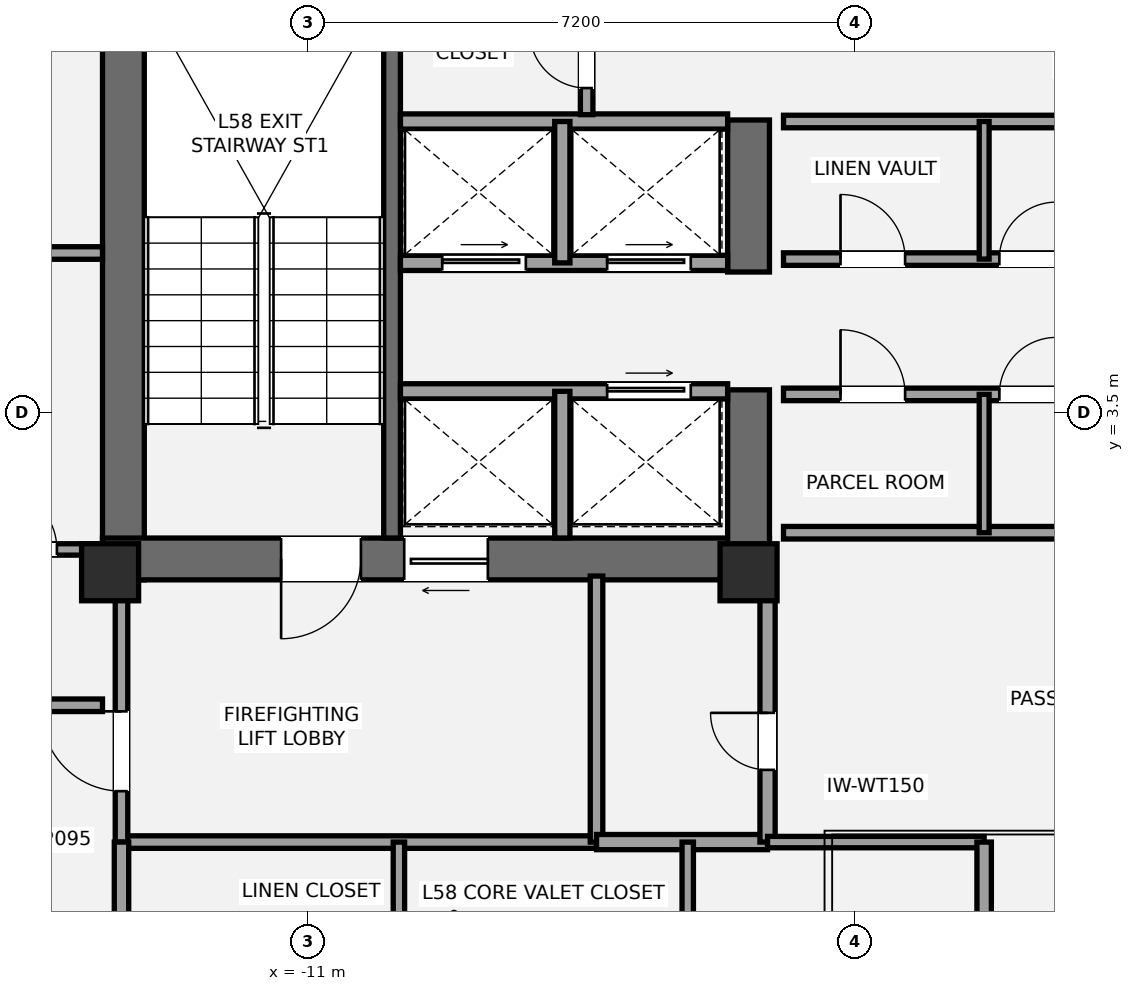
"""IFC4 building model, lengths in metres.
Left out: names, types, materials, properties, quantities, classifications, styles, units other than length and angle.
Written with IfcOpenShell. Run it as: python <this file> out.ifc"""

import sys

from ifc_helpers import new_model, si_unit, direction, frame, frame_2d, origin, origin_2d, place, context, subcontext, project, spatial, rectangle, extrude, element, fill, save


model = new_model("IFC4")
c1 = context("Model", 3, precision=1e-05, world=origin(), true_north=direction((0.0, 1.0)))
c2 = subcontext(c1, "Body", "Model", "MODEL_VIEW")
j1 = project(units=[si_unit("LENGTHUNIT", "METRE"), si_unit("PLANEANGLEUNIT", "RADIAN")], contexts=[c1])
p1 = place(None, origin())
s1 = spatial("IfcSite", under=j1, at=p1, CompositionType="ELEMENT")
p2 = place(p1, origin())
s2 = spatial("IfcBuilding", under=s1, at=p2, CompositionType="ELEMENT")
p3 = place(p2, frame((0.0, 0.0, 210.0)))
s3 = spatial("IfcBuildingStorey", under=s2, at=p3, CompositionType="ELEMENT", Elevation=210.0)
p4 = place(p3, frame((-13.425, 1.3, 0.0), z_axis=(0.0, 0.0, 1.0), x_axis=(0.0, 1.0, 0.0)))
e1 = element("IfcWall", 1, at=p4, inside=s3, PredefinedType="SHEAR", context=c2, shape_type="SweptSolid", body=[
    extrude(rectangle(XDim=8.25, YDim=0.55, at=frame_2d((4.125, 0.0))), origin(), (0.0, 0.0, 1.0), 3.15),
])
p5 = place(p3, frame((-4.925, 1.575, 0.0), z_axis=(0.0, 0.0, 1.0), x_axis=(-1.0, 0.0, 0.0)))
e2 = element("IfcWall", 2, at=p5, inside=s3, PredefinedType="SHEAR", context=c2, shape_type="SweptSolid", body=[
    extrude(rectangle(XDim=8.775, YDim=0.55, at=frame_2d((4.387, 0.0))), origin(), (0.0, 0.0, 1.0), 3.15),
])
p6 = place(p5, frame((5.375, 0.0, 0.0)))
e3 = element("IfcOpeningElement", 3, at=p6, cuts=e2, PredefinedType="OPENING", context=c2, shape_type="SweptSolid", body=[
    extrude(rectangle(XDim=1.05, YDim=2.15, at=frame_2d((0.525, 1.075))), frame((0.0, 0.285, 0.0), z_axis=(0.0, -1.0, 0.0), x_axis=(1.0, 0.0, 0.0)), (0.0, 0.0, 1.0), 0.57),
])
p7 = place(p5, frame((3.705, 0.0, 0.0)))
e4 = element("IfcOpeningElement", 4, at=p7, cuts=e2, PredefinedType="OPENING", context=c2, shape_type="SweptSolid", body=[
    extrude(rectangle(XDim=1.1, YDim=2.2, at=frame_2d((0.55, 1.1))), frame((0.0, 0.285, 0.0), z_axis=(0.0, -1.0, 0.0), x_axis=(1.0, 0.0, 0.0)), (0.0, 0.0, 1.0), 0.57),
])
p8 = place(p3, frame((-5.2, 1.3, 0.0), z_axis=(0.0, 0.0, 1.0), x_axis=(0.0, 1.0, 0.0)))
e5 = element("IfcWall", 5, at=p8, inside=s3, PredefinedType="SHEAR", context=c2, shape_type="SweptSolid", body=[
    extrude(rectangle(XDim=2.5, YDim=0.55, at=frame_2d((1.25, 0.0))), origin(), (0.0, 0.0, 1.0), 3.15),
])
p9 = place(p3, frame((-5.2, 5.35, 0.0), z_axis=(0.0, 0.0, 1.0), x_axis=(0.0, 1.0, 0.0)))
e6 = element("IfcWall", 6, at=p9, inside=s3, PredefinedType="SHEAR", context=c2, shape_type="SweptSolid", body=[
    extrude(rectangle(XDim=2.0, YDim=0.55, at=frame_2d((1.0, 0.0))), origin(), (0.0, 0.0, 1.0), 3.15),
])
p10 = place(p3, frame((-9.89, 1.85, 0.0), z_axis=(0.0, 0.0, 1.0), x_axis=(0.0, 1.0, 0.0)))
e7 = element("IfcWall", 7, at=p10, inside=s3, PredefinedType="SHEAR", context=c2, shape_type="SweptSolid", body=[
    extrude(rectangle(XDim=7.15, YDim=0.22, at=frame_2d((3.575, 0.0))), origin(), (0.0, 0.0, 1.0), 3.15),
])
for number, where, z_axis, x_axis in (
    (8, (-13.6, 1.4, 0.0), (0.0, 0.0, 1.0), (1.0, 0.0, 0.0)),
    (9, (-5.2, 1.4, 0.0), (0.0, 0.0, 1.0), (1.0, 0.0, 0.0)),
):
    element("IfcColumn", number, at=place(p3, frame(where, z_axis=z_axis, x_axis=x_axis)), inside=s3, PredefinedType="PILASTER", context=c2, shape_type="SweptSolid", body=[
        extrude(rectangle(XDim=0.75, YDim=0.75, at=origin_2d()), origin(), (0.0, 0.0, 1.0), 3.15),
    ])
p11 = place(p3, frame((-13.45, -2.15, 0.0), z_axis=(0.0, 0.0, 1.0), x_axis=(1.0, 0.0, 0.0)))
e10 = element("IfcWall", 10, at=p11, inside=s3, PredefinedType="PARTITIONING", context=c2, shape_type="SweptSolid", body=[
    extrude(rectangle(XDim=6.25, YDim=0.165, at=frame_2d((3.125, 0.0))), origin(), (0.0, 0.0, 1.0), 2.423),
])
p12 = place(p3, frame((-13.45, -2.15, 0.0), z_axis=(0.0, 0.0, 1.0), x_axis=(0.0, 1.0, 0.0)))
e11 = element("IfcWall", 11, at=p12, inside=s3, PredefinedType="PARTITIONING", context=c2, shape_type="SweptSolid", body=[
    extrude(rectangle(XDim=3.5, YDim=0.165, at=frame_2d((1.75, 0.0))), origin(), (0.0, 0.0, 1.0), 2.423),
])
p13 = place(p12, frame((0.67, 0.0, 0.0)))
e12 = element("IfcOpeningElement", 12, at=p13, cuts=e11, PredefinedType="OPENING", context=c2, shape_type="SweptSolid", body=[
    extrude(rectangle(XDim=1.05, YDim=2.15, at=frame_2d((0.525, 1.075))), frame((0.0, 0.093, 0.0), z_axis=(0.0, -1.0, 0.0), x_axis=(1.0, 0.0, 0.0)), (0.0, 0.0, 1.0), 0.185),
])
p14 = place(p3, frame((-7.2, -2.15, 0.0), z_axis=(0.0, 0.0, 1.0), x_axis=(0.0, 1.0, 0.0)))
e13 = element("IfcWall", 13, at=p14, inside=s3, PredefinedType="PARTITIONING", context=c2, shape_type="SweptSolid", body=[
    extrude(rectangle(XDim=3.5, YDim=0.165, at=frame_2d((1.75, 0.0))), origin(), (0.0, 0.0, 1.0), 2.423),
])
p15 = place(p3, frame((-7.2, -2.15, 0.0), z_axis=(0.0, 0.0, 1.0), x_axis=(1.0, 0.0, 0.0)))
e14 = element("IfcWall", 14, at=p15, inside=s3, PredefinedType="SOLIDWALL", context=c2, shape_type="SweptSolid", body=[
    extrude(rectangle(XDim=2.25, YDim=0.2, at=frame_2d((1.125, 0.0))), origin(), (0.0, 0.0, 1.0), 2.423),
])
p16 = place(p3, frame((-4.95, -2.15, 0.0), z_axis=(0.0, 0.0, 1.0), x_axis=(0.0, 1.0, 0.0)))
e15 = element("IfcWall", 15, at=p16, inside=s3, PredefinedType="SOLIDWALL", context=c2, shape_type="SweptSolid", body=[
    extrude(rectangle(XDim=3.5, YDim=0.2, at=frame_2d((1.75, 0.0))), origin(), (0.0, 0.0, 1.0), 2.423),
])
p17 = place(p16, frame((0.95, 0.0, 0.0)))
e16 = element("IfcOpeningElement", 16, at=p17, cuts=e15, PredefinedType="OPENING", context=c2, shape_type="SweptSolid", body=[
    extrude(rectangle(XDim=0.75, YDim=2.1, at=frame_2d((0.375, 1.05))), frame((0.0, 0.11, 0.0), z_axis=(0.0, -1.0, 0.0), x_axis=(1.0, 0.0, 0.0)), (0.0, 0.0, 1.0), 0.22),
])
p18 = place(p3, frame((-9.78, 3.78, 0.0), z_axis=(0.0, 0.0, 1.0), x_axis=(1.0, 0.0, 0.0)))
e17 = element("IfcWall", 17, at=p18, inside=s3, PredefinedType="SOLIDWALL", context=c2, shape_type="SweptSolid", body=[
    extrude(rectangle(XDim=4.305, YDim=0.2, at=frame_2d((2.152, 0.0))), origin(), (0.0, 0.0, 1.0), 2.97),
])
p19 = place(p18, frame((2.72, 0.0, 0.0)))
e18 = element("IfcOpeningElement", 18, at=p19, cuts=e17, PredefinedType="OPENING", context=c2, shape_type="SweptSolid", body=[
    extrude(rectangle(XDim=1.1, YDim=2.2, at=frame_2d((0.55, 1.1))), frame((0.0, 0.11, 0.0), z_axis=(0.0, -1.0, 0.0), x_axis=(1.0, 0.0, 0.0)), (0.0, 0.0, 1.0), 0.22),
])
p20 = place(p3, frame((-7.65, 1.85, 0.0), z_axis=(0.0, 0.0, 1.0), x_axis=(0.0, 1.0, 0.0)))
e19 = element("IfcWall", 19, at=p20, inside=s3, PredefinedType="SOLIDWALL", context=c2, shape_type="SweptSolid", body=[
    extrude(rectangle(XDim=1.93, YDim=0.2, at=frame_2d((0.965, 0.0))), origin(), (0.0, 0.0, 1.0), 2.97),
])
p21 = place(p3, frame((-9.78, 5.47, 0.0), z_axis=(0.0, 0.0, 1.0), x_axis=(1.0, 0.0, 0.0)))
e20 = element("IfcWall", 20, at=p21, inside=s3, PredefinedType="SOLIDWALL", context=c2, shape_type="SweptSolid", body=[
    extrude(rectangle(XDim=4.305, YDim=0.2, at=frame_2d((2.152, 0.0))), origin(), (0.0, 0.0, 1.0), 2.97),
])
p22 = place(p21, frame((0.55, 0.0, 0.0)))
e21 = element("IfcOpeningElement", 21, at=p22, cuts=e20, PredefinedType="OPENING", context=c2, shape_type="SweptSolid", body=[
    extrude(rectangle(XDim=1.1, YDim=2.2, at=frame_2d((0.55, 1.1))), frame((0.0, 0.11, 0.0), z_axis=(0.0, -1.0, 0.0), x_axis=(1.0, 0.0, 0.0)), (0.0, 0.0, 1.0), 0.22),
])
p23 = place(p21, frame((2.72, 0.0, 0.0)))
e22 = element("IfcOpeningElement", 22, at=p23, cuts=e20, PredefinedType="OPENING", context=c2, shape_type="SweptSolid", body=[
    extrude(rectangle(XDim=1.1, YDim=2.2, at=frame_2d((0.55, 1.1))), frame((0.0, 0.11, 0.0), z_axis=(0.0, -1.0, 0.0), x_axis=(1.0, 0.0, 0.0)), (0.0, 0.0, 1.0), 0.22),
])
p24 = place(p3, frame((-9.78, 7.33, 0.0), z_axis=(0.0, 0.0, 1.0), x_axis=(1.0, 0.0, 0.0)))
e23 = element("IfcWall", 23, at=p24, inside=s3, PredefinedType="SOLIDWALL", context=c2, shape_type="SweptSolid", body=[
    extrude(rectangle(XDim=4.305, YDim=0.2, at=frame_2d((2.152, 0.0))), origin(), (0.0, 0.0, 1.0), 2.97),
])
p25 = place(p3, frame((-7.65, 5.47, 0.0), z_axis=(0.0, 0.0, 1.0), x_axis=(0.0, 1.0, 0.0)))
e24 = element("IfcWall", 24, at=p25, inside=s3, PredefinedType="SOLIDWALL", context=c2, shape_type="SweptSolid", body=[
    extrude(rectangle(XDim=1.86, YDim=0.2, at=frame_2d((0.93, 0.0))), origin(), (0.0, 0.0, 1.0), 2.97),
])
p26 = place(p3, frame((-4.74, 1.92, 0.0), z_axis=(0.0, 0.0, 1.0), x_axis=(1.0, 0.0, 0.0)))
e25 = element("IfcWall", 25, at=p26, inside=s3, PredefinedType="PARTITIONING", context=c2, shape_type="SweptSolid", body=[
    extrude(rectangle(XDim=3.89, YDim=0.165, at=frame_2d((1.945, 0.0))), origin(), (0.0, 0.0, 1.0), 2.11),
])
p27 = place(p3, frame((-4.74, 3.74, 0.0), z_axis=(0.0, 0.0, 1.0), x_axis=(1.0, 0.0, 0.0)))
e26 = element("IfcWall", 26, at=p27, inside=s3, PredefinedType="PARTITIONING", context=c2, shape_type="SweptSolid", body=[
    extrude(rectangle(XDim=3.89, YDim=0.165, at=frame_2d((1.945, 0.0))), origin(), (0.0, 0.0, 1.0), 2.97),
])
p28 = place(p27, frame((0.75, 0.0, 0.0)))
e27 = element("IfcOpeningElement", 27, at=p28, cuts=e26, PredefinedType="OPENING", context=c2, shape_type="SweptSolid", body=[
    extrude(rectangle(XDim=0.85, YDim=2.1, at=frame_2d((0.425, 1.05))), frame((0.0, 0.093, 0.0), z_axis=(0.0, -1.0, 0.0), x_axis=(1.0, 0.0, 0.0)), (0.0, 0.0, 1.0), 0.185),
])
p29 = place(p27, frame((2.84, 0.0, 0.0)))
e28 = element("IfcOpeningElement", 28, at=p29, cuts=e26, PredefinedType="OPENING", context=c2, shape_type="SweptSolid", body=[
    extrude(rectangle(XDim=0.75, YDim=2.1, at=frame_2d((0.375, 1.05))), frame((0.0, 0.093, 0.0), z_axis=(0.0, -1.0, 0.0), x_axis=(1.0, 0.0, 0.0)), (0.0, 0.0, 1.0), 0.185),
])
p30 = place(p3, frame((-2.1, 1.92, 0.0), z_axis=(0.0, 0.0, 1.0), x_axis=(0.0, 1.0, 0.0)))
e29 = element("IfcWall", 29, at=p30, inside=s3, PredefinedType="PARTITIONING", context=c2, shape_type="SweptSolid", body=[
    extrude(rectangle(XDim=1.82, YDim=0.13, at=frame_2d((0.91, 0.0))), origin(), (0.0, 0.0, 1.0), 2.97),
])
p31 = place(p3, frame((-4.74, 5.52, 0.0), z_axis=(0.0, 0.0, 1.0), x_axis=(1.0, 0.0, 0.0)))
e30 = element("IfcWall", 30, at=p31, inside=s3, PredefinedType="PARTITIONING", context=c2, shape_type="SweptSolid", body=[
    extrude(rectangle(XDim=3.89, YDim=0.165, at=frame_2d((1.945, 0.0))), origin(), (0.0, 0.0, 1.0), 2.97),
])
p32 = place(p31, frame((0.75, 0.0, 0.0)))
e31 = element("IfcOpeningElement", 31, at=p32, cuts=e30, PredefinedType="OPENING", context=c2, shape_type="SweptSolid", body=[
    extrude(rectangle(XDim=0.85, YDim=2.1, at=frame_2d((0.425, 1.05))), frame((0.0, 0.093, 0.0), z_axis=(0.0, -1.0, 0.0), x_axis=(1.0, 0.0, 0.0)), (0.0, 0.0, 1.0), 0.185),
])
p33 = place(p31, frame((2.84, 0.0, 0.0)))
e32 = element("IfcOpeningElement", 32, at=p33, cuts=e30, PredefinedType="OPENING", context=c2, shape_type="SweptSolid", body=[
    extrude(rectangle(XDim=0.75, YDim=2.1, at=frame_2d((0.375, 1.05))), frame((0.0, 0.093, 0.0), z_axis=(0.0, -1.0, 0.0), x_axis=(1.0, 0.0, 0.0)), (0.0, 0.0, 1.0), 0.185),
])
p34 = place(p3, frame((-4.74, 7.33, 0.0), z_axis=(0.0, 0.0, 1.0), x_axis=(1.0, 0.0, 0.0)))
e33 = element("IfcWall", 33, at=p34, inside=s3, PredefinedType="PARTITIONING", context=c2, shape_type="SweptSolid", body=[
    extrude(rectangle(XDim=3.89, YDim=0.165, at=frame_2d((1.945, 0.0))), origin(), (0.0, 0.0, 1.0), 2.97),
])
p35 = place(p3, frame((-2.1, 5.52, 0.0), z_axis=(0.0, 0.0, 1.0), x_axis=(0.0, 1.0, 0.0)))
e34 = element("IfcWall", 34, at=p35, inside=s3, PredefinedType="PARTITIONING", context=c2, shape_type="SweptSolid", body=[
    extrude(rectangle(XDim=1.81, YDim=0.13, at=frame_2d((0.905, 0.0))), origin(), (0.0, 0.0, 1.0), 2.97),
])
p36 = place(p3, frame((-7.33, 7.42, 0.0), z_axis=(0.0, 0.0, 1.0), x_axis=(0.0, 1.0, 0.0)))
e35 = element("IfcWall", 35, at=p36, inside=s3, PredefinedType="PARTITIONING", context=c2, shape_type="SweptSolid", body=[
    extrude(rectangle(XDim=1.58, YDim=0.165, at=frame_2d((0.79, 0.0))), origin(), (0.0, 0.0, 1.0), 2.97),
])
p37 = place(p36, frame((0.35, 0.0, 0.0)))
e36 = element("IfcOpeningElement", 36, at=p37, cuts=e35, PredefinedType="OPENING", context=c2, shape_type="SweptSolid", body=[
    extrude(rectangle(XDim=0.75, YDim=2.1, at=frame_2d((0.375, 1.05))), frame((0.0, 0.093, 0.0), z_axis=(0.0, -1.0, 0.0), x_axis=(1.0, 0.0, 0.0)), (0.0, 0.0, 1.0), 0.185),
])
p38 = place(p3, frame((-4.95, -2.15, 0.0), z_axis=(0.0, 0.0, 1.0), x_axis=(1.0, 0.0, 0.0)))
e37 = element("IfcWall", 37, at=p38, inside=s3, PredefinedType="PLUMBINGWALL", context=c2, shape_type="SweptSolid", body=[
    extrude(rectangle(XDim=2.85, YDim=0.15, at=frame_2d((1.425, 0.0))), origin(), (0.0, 0.0, 1.0), 2.97),
])
for number, where, z_axis, x_axis in (
    (38, (-13.45, -4.05, 0.0), (0.0, 0.0, 1.0), (0.0, 1.0, 0.0)),
    (39, (-2.1, -4.05, 0.0), (0.0, 0.0, 1.0), (0.0, 1.0, 0.0)),
):
    element("IfcWall", number, at=place(p3, frame(where, z_axis=z_axis, x_axis=x_axis)), inside=s3, PredefinedType="PLUMBINGWALL", context=c2, shape_type="SweptSolid", body=[
        extrude(rectangle(XDim=1.9, YDim=0.19, at=frame_2d((0.95, 0.0))), origin(), (0.0, 0.0, 1.0), 2.423),
    ])
p39 = place(p3, frame((-9.8, -4.05, 0.0), z_axis=(0.0, 0.0, 1.0), x_axis=(0.0, 1.0, 0.0)))
e40 = element("IfcWall", 40, at=p39, inside=s3, PredefinedType="PLUMBINGWALL", context=c2, shape_type="SweptSolid", body=[
    extrude(rectangle(XDim=1.9, YDim=0.15, at=frame_2d((0.95, 0.0))), origin(), (0.0, 0.0, 1.0), 2.97),
])
p40 = place(p3, frame((-6.0, -4.05, 0.0), z_axis=(0.0, 0.0, 1.0), x_axis=(0.0, 1.0, 0.0)))
e41 = element("IfcWall", 41, at=p40, inside=s3, PredefinedType="PLUMBINGWALL", context=c2, shape_type="SweptSolid", body=[
    extrude(rectangle(XDim=1.9, YDim=0.15, at=frame_2d((0.95, 0.0))), origin(), (0.0, 0.0, 1.0), 2.423),
])
p41 = place(p3, frame((-15.55, -0.35, 0.0), z_axis=(0.0, 0.0, 1.0), x_axis=(1.0, 0.0, 0.0)))
e42 = element("IfcWall", 42, at=p41, inside=s3, PredefinedType="PARTITIONING", context=c2, shape_type="SweptSolid", body=[
    extrude(rectangle(XDim=1.85, YDim=0.165, at=frame_2d((0.925, 0.0))), origin(), (0.0, 0.0, 1.0), 2.97),
])
p42 = place(p3, frame((-20.845, 5.6, 0.0), z_axis=(0.0, 0.0, 1.0), x_axis=(1.0, 0.0, 0.0)))
e43 = element("IfcWall", 43, at=p42, inside=s3, PredefinedType="PARTITIONING", context=c2, shape_type="SweptSolid", body=[
    extrude(rectangle(XDim=7.145, YDim=0.165, at=frame_2d((3.572, 0.0))), origin(), (0.0, 0.0, 1.0), 2.423),
])
p43 = place(p42, frame((2.618, 0.0, 0.0)))
e44 = element("IfcOpeningElement", 44, at=p43, cuts=e43, PredefinedType="OPENING", context=c2, shape_type="SweptSolid", body=[
    extrude(rectangle(XDim=0.85, YDim=2.1, at=frame_2d((0.425, 1.05))), frame((0.0, 0.093, 0.0), z_axis=(0.0, -1.0, 0.0), x_axis=(1.0, 0.0, 0.0)), (0.0, 0.0, 1.0), 0.185),
])
p44 = place(p3, frame((-17.95, 1.7, 0.0), z_axis=(0.0, 0.0, 1.0), x_axis=(1.0, 0.0, 0.0)))
e45 = element("IfcWall", 45, at=p44, inside=s3, PredefinedType="PLUMBINGWALL", context=c2, shape_type="SweptSolid", body=[
    extrude(rectangle(XDim=4.25, YDim=0.15, at=frame_2d((2.125, 0.0))), origin(), (0.0, 0.0, 1.0), 2.423),
])
p45 = place(p44, frame((2.85, 0.0, 0.0)))
e46 = element("IfcOpeningElement", 46, at=p45, cuts=e45, PredefinedType="OPENING", context=c2, shape_type="SweptSolid", body=[
    extrude(rectangle(XDim=0.8, YDim=2.1, at=frame_2d((0.4, 1.05))), frame((0.0, 0.085, 0.0), z_axis=(0.0, -1.0, 0.0), x_axis=(1.0, 0.0, 0.0)), (0.0, 0.0, 1.0), 0.17),
])
p46 = place(p44, frame((1.27, 0.0, 0.0)))
e47 = element("IfcOpeningElement", 47, at=p46, cuts=e45, PredefinedType="OPENING", context=c2, shape_type="SweptSolid", body=[
    extrude(rectangle(XDim=0.85, YDim=2.1, at=frame_2d((0.425, 1.05))), frame((0.0, 0.085, 0.0), z_axis=(0.0, -1.0, 0.0), x_axis=(1.0, 0.0, 0.0)), (0.0, 0.0, 1.0), 0.17),
])
p47 = place(p6, origin())
e48 = element("IfcDoor", 48, at=p47, inside=s3, OperationType="SINGLE_SWING_RIGHT", PredefinedType="DOOR", context=c2, shape_type="SweptSolid", body=[
    extrude(rectangle(XDim=1.05, YDim=2.15, at=frame_2d((0.525, 1.075))), frame((0.0, 0.025, 0.0), z_axis=(0.0, -1.0, 0.0), x_axis=(1.0, 0.0, 0.0)), (0.0, 0.0, 1.0), 0.05),
])
fill(e3, e48)
p48 = place(p13, origin())
e49 = element("IfcDoor", 49, at=p48, inside=s3, OperationType="SINGLE_SWING_RIGHT", PredefinedType="DOOR", context=c2, shape_type="SweptSolid", body=[
    extrude(rectangle(XDim=1.05, YDim=2.15, at=frame_2d((0.525, 1.075))), frame((0.0, 0.025, 0.0), z_axis=(0.0, -1.0, 0.0), x_axis=(1.0, 0.0, 0.0)), (0.0, 0.0, 1.0), 0.05),
])
fill(e12, e49)
p49 = place(p17, origin())
e50 = element("IfcDoor", 50, at=p49, inside=s3, OperationType="SINGLE_SWING_RIGHT", PredefinedType="DOOR", context=c2, shape_type="SweptSolid", body=[
    extrude(rectangle(XDim=0.75, YDim=2.1, at=frame_2d((0.375, 1.05))), frame((0.0, 0.025, 0.0), z_axis=(0.0, -1.0, 0.0), x_axis=(1.0, 0.0, 0.0)), (0.0, 0.0, 1.0), 0.05),
])
fill(e16, e50)
p50 = place(p7, origin())
e51 = element("IfcDoor", 51, at=p50, inside=s3, OperationType="SLIDING_TO_LEFT", PredefinedType="DOOR", context=c2, shape_type="SweptSolid", body=[
    extrude(rectangle(XDim=1.1, YDim=2.2, at=frame_2d((0.55, 1.1))), frame((0.0, 0.025, 0.0), z_axis=(0.0, -1.0, 0.0), x_axis=(1.0, 0.0, 0.0)), (0.0, 0.0, 1.0), 0.05),
])
fill(e4, e51)
p51 = place(p22, origin())
e52 = element("IfcDoor", 52, at=p51, inside=s3, OperationType="SLIDING_TO_LEFT", PredefinedType="DOOR", context=c2, shape_type="SweptSolid", body=[
    extrude(rectangle(XDim=1.1, YDim=2.2, at=frame_2d((0.55, 1.1))), frame((0.0, 0.025, 0.0), z_axis=(0.0, -1.0, 0.0), x_axis=(1.0, 0.0, 0.0)), (0.0, 0.0, 1.0), 0.05),
])
fill(e21, e52)
p52 = place(p23, origin())
e53 = element("IfcDoor", 53, at=p52, inside=s3, OperationType="SLIDING_TO_LEFT", PredefinedType="DOOR", context=c2, shape_type="SweptSolid", body=[
    extrude(rectangle(XDim=1.1, YDim=2.2, at=frame_2d((0.55, 1.1))), frame((0.0, 0.025, 0.0), z_axis=(0.0, -1.0, 0.0), x_axis=(1.0, 0.0, 0.0)), (0.0, 0.0, 1.0), 0.05),
])
fill(e22, e53)
p53 = place(p19, origin())
e54 = element("IfcDoor", 54, at=p53, inside=s3, OperationType="SLIDING_TO_LEFT", PredefinedType="DOOR", context=c2, shape_type="SweptSolid", body=[
    extrude(rectangle(XDim=1.1, YDim=2.2, at=frame_2d((0.55, 1.1))), frame((0.0, 0.025, 0.0), z_axis=(0.0, -1.0, 0.0), x_axis=(1.0, 0.0, 0.0)), (0.0, 0.0, 1.0), 0.05),
])
fill(e18, e54)
p54 = place(p28, origin())
e55 = element("IfcDoor", 55, at=p54, inside=s3, OperationType="SINGLE_SWING_LEFT", PredefinedType="DOOR", context=c2, shape_type="SweptSolid", body=[
    extrude(rectangle(XDim=0.85, YDim=2.1, at=frame_2d((0.425, 1.05))), frame((0.0, 0.025, 0.0), z_axis=(0.0, -1.0, 0.0), x_axis=(1.0, 0.0, 0.0)), (0.0, 0.0, 1.0), 0.05),
])
fill(e27, e55)
p55 = place(p29, origin())
e56 = element("IfcDoor", 56, at=p55, inside=s3, OperationType="SINGLE_SWING_RIGHT", PredefinedType="DOOR", context=c2, shape_type="SweptSolid", body=[
    extrude(rectangle(XDim=0.75, YDim=2.1, at=frame_2d((0.375, 1.05))), frame((0.0, 0.025, 0.0), z_axis=(0.0, -1.0, 0.0), x_axis=(1.0, 0.0, 0.0)), (0.0, 0.0, 1.0), 0.05),
])
fill(e28, e56)
p56 = place(p32, origin())
e57 = element("IfcDoor", 57, at=p56, inside=s3, OperationType="SINGLE_SWING_LEFT", PredefinedType="DOOR", context=c2, shape_type="SweptSolid", body=[
    extrude(rectangle(XDim=0.85, YDim=2.1, at=frame_2d((0.425, 1.05))), frame((0.0, 0.025, 0.0), z_axis=(0.0, -1.0, 0.0), x_axis=(1.0, 0.0, 0.0)), (0.0, 0.0, 1.0), 0.05),
])
fill(e31, e57)
p57 = place(p33, origin())
e58 = element("IfcDoor", 58, at=p57, inside=s3, OperationType="SINGLE_SWING_RIGHT", PredefinedType="DOOR", context=c2, shape_type="SweptSolid", body=[
    extrude(rectangle(XDim=0.75, YDim=2.1, at=frame_2d((0.375, 1.05))), frame((0.0, 0.025, 0.0), z_axis=(0.0, -1.0, 0.0), x_axis=(1.0, 0.0, 0.0)), (0.0, 0.0, 1.0), 0.05),
])
fill(e32, e58)
p58 = place(p37, origin())
e59 = element("IfcDoor", 59, at=p58, inside=s3, OperationType="SINGLE_SWING_RIGHT", PredefinedType="DOOR", context=c2, shape_type="SweptSolid", body=[
    extrude(rectangle(XDim=0.75, YDim=2.1, at=frame_2d((0.375, 1.05))), frame((0.0, 0.025, 0.0), z_axis=(0.0, -1.0, 0.0), x_axis=(1.0, 0.0, 0.0)), (0.0, 0.0, 1.0), 0.05),
])
fill(e36, e59)
p59 = place(p45, origin())
e60 = element("IfcDoor", 60, at=p59, inside=s3, OperationType="SINGLE_SWING_LEFT", PredefinedType="DOOR", context=c2, shape_type="SweptSolid", body=[
    extrude(rectangle(XDim=0.8, YDim=2.1, at=frame_2d((0.4, 1.05))), frame((0.0, 0.025, 0.0), z_axis=(0.0, -1.0, 0.0), x_axis=(1.0, 0.0, 0.0)), (0.0, 0.0, 1.0), 0.05),
])
fill(e46, e60)
save(model, sys.argv[1])
